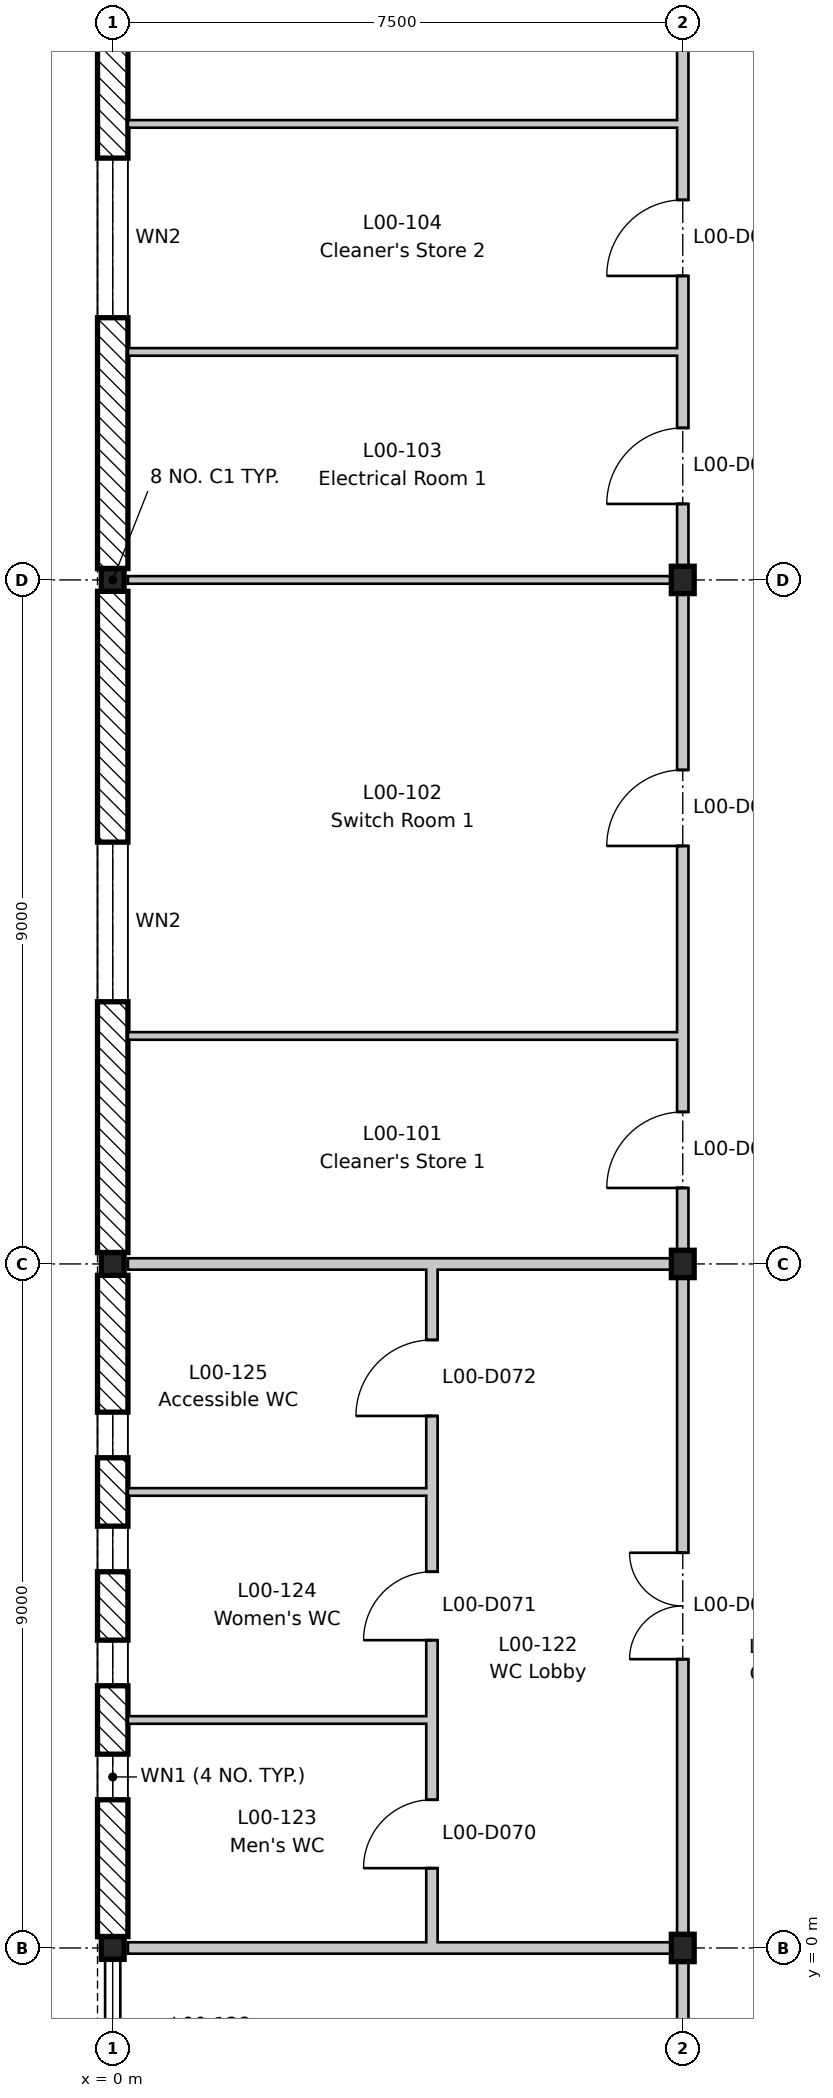
"""IFC4 building model, lengths in metres.
Left out: names, types, materials, properties, quantities, classifications, styles, units other than length and angle.
Written with IfcOpenShell. Run it as: python <this file> out.ifc"""

import sys

from ifc_helpers import new_model, si_unit, direction, frame, frame_2d, origin, origin_2d, place, context, subcontext, project, spatial, rectangle, i_section, extrude, element, fill, save


model = new_model("IFC4")
c1 = context("Model", 3, precision=1e-05, world=origin(), true_north=direction((0.0, 1.0)))
c2 = subcontext(c1, "Body", "Model", "MODEL_VIEW")
j1 = project(units=[si_unit("LENGTHUNIT", "METRE"), si_unit("PLANEANGLEUNIT", "RADIAN")], contexts=[c1])
p1 = place(None, origin())
s1 = spatial("IfcSite", under=j1, at=p1, CompositionType="ELEMENT")
p2 = place(p1, origin())
s2 = spatial("IfcBuilding", under=s1, at=p2, CompositionType="ELEMENT")
p3 = place(p2, origin())
s3 = spatial("IfcBuildingStorey", under=s2, at=p3, CompositionType="ELEMENT", Elevation=0.0)
for number, where, z_axis, x_axis in (
    (1, (0.0, 0.0, -0.6), (0.0, 0.0, 1.0), (1.0, 0.0, 0.0)),
    (2, (0.0, 9.0, -0.6), (0.0, 0.0, 1.0), (1.0, 0.0, 0.0)),
    (3, (0.0, 18.0, -0.6), (0.0, 0.0, 1.0), (1.0, 0.0, 0.0)),
):
    element("IfcColumn", number, at=place(p3, frame(where, z_axis=z_axis, x_axis=x_axis)), inside=s3, PredefinedType="COLUMN", context=c2, shape_type="SweptSolid", body=[
        extrude(i_section(OverallWidth=0.3, OverallDepth=0.3, WebThickness=0.011, FlangeThickness=0.019, FilletRadius=0.027, at=origin_2d()), origin(), (0.0, 0.0, 1.0), 5.8),
    ])
for number, where, z_axis, x_axis in (
    (4, (7.5, 0.0, -0.6), (0.0, 0.0, 1.0), (1.0, 0.0, 0.0)),
    (5, (7.5, 9.0, -0.6), (0.0, 0.0, 1.0), (1.0, 0.0, 0.0)),
    (6, (7.5, 18.0, -0.6), (0.0, 0.0, 1.0), (1.0, 0.0, 0.0)),
):
    element("IfcColumn", number, at=place(p3, frame(where, z_axis=z_axis, x_axis=x_axis)), inside=s3, PredefinedType="COLUMN", context=c2, shape_type="SweptSolid", body=[
        extrude(i_section(OverallWidth=0.3, OverallDepth=0.36, WebThickness=0.012, FlangeThickness=0.022, FilletRadius=0.027, at=origin_2d()), origin(), (0.0, 0.0, 1.0), 5.8),
    ])
p4 = place(p3, frame((0.0, 0.15, 0.0), z_axis=(0.0, 0.0, 1.0), x_axis=(0.0, 1.0, 0.0)))
e7 = element("IfcWall", 7, at=p4, inside=s3, PredefinedType="STANDARD", context=c2, shape_type="SweptSolid", body=[
    extrude(rectangle(XDim=8.7, YDim=0.4, at=frame_2d((4.35, 0.0))), origin(), (0.0, 0.0, 1.0), 4.8),
])
p5 = place(p4, frame((1.8, 0.0, 1.5)))
e8 = element("IfcOpeningElement", 8, at=p5, cuts=e7, PredefinedType="OPENING", context=c2, shape_type="SweptSolid", body=[
    extrude(rectangle(XDim=0.6, YDim=1.2, at=frame_2d((0.3, 0.6))), frame((0.0, 0.21, 0.0), z_axis=(0.0, -1.0, 0.0), x_axis=(1.0, 0.0, 0.0)), (0.0, 0.0, 1.0), 0.42),
])
p6 = place(p4, frame((3.3, 0.0, 1.5)))
e9 = element("IfcOpeningElement", 9, at=p6, cuts=e7, PredefinedType="OPENING", context=c2, shape_type="SweptSolid", body=[
    extrude(rectangle(XDim=0.6, YDim=1.2, at=frame_2d((0.3, 0.6))), frame((0.0, 0.21, 0.0), z_axis=(0.0, -1.0, 0.0), x_axis=(1.0, 0.0, 0.0)), (0.0, 0.0, 1.0), 0.42),
])
p7 = place(p4, frame((4.8, 0.0, 1.5)))
e10 = element("IfcOpeningElement", 10, at=p7, cuts=e7, PredefinedType="OPENING", context=c2, shape_type="SweptSolid", body=[
    extrude(rectangle(XDim=0.6, YDim=1.2, at=frame_2d((0.3, 0.6))), frame((0.0, 0.21, 0.0), z_axis=(0.0, -1.0, 0.0), x_axis=(1.0, 0.0, 0.0)), (0.0, 0.0, 1.0), 0.42),
])
p8 = place(p4, frame((6.3, 0.0, 1.5)))
e11 = element("IfcOpeningElement", 11, at=p8, cuts=e7, PredefinedType="OPENING", context=c2, shape_type="SweptSolid", body=[
    extrude(rectangle(XDim=0.6, YDim=1.2, at=frame_2d((0.3, 0.6))), frame((0.0, 0.21, 0.0), z_axis=(0.0, -1.0, 0.0), x_axis=(1.0, 0.0, 0.0)), (0.0, 0.0, 1.0), 0.42),
])
p9 = place(p3, frame((0.0, 9.15, 0.0), z_axis=(0.0, 0.0, 1.0), x_axis=(0.0, 1.0, 0.0)))
e12 = element("IfcWall", 12, at=p9, inside=s3, PredefinedType="STANDARD", context=c2, shape_type="SweptSolid", body=[
    extrude(rectangle(XDim=8.7, YDim=0.4, at=frame_2d((4.35, 0.0))), origin(), (0.0, 0.0, 1.0), 4.8),
])
p10 = place(p9, frame((3.3, 0.0, 0.9)))
e13 = element("IfcOpeningElement", 13, at=p10, cuts=e12, PredefinedType="OPENING", context=c2, shape_type="SweptSolid", body=[
    extrude(rectangle(XDim=2.1, YDim=2.1, at=frame_2d((1.05, 1.05))), frame((0.0, 0.21, 0.0), z_axis=(0.0, -1.0, 0.0), x_axis=(1.0, 0.0, 0.0)), (0.0, 0.0, 1.0), 0.42),
])
p11 = place(p3, frame((0.0, 18.15, 0.0), z_axis=(0.0, 0.0, 1.0), x_axis=(0.0, 1.0, 0.0)))
e14 = element("IfcWall", 14, at=p11, inside=s3, PredefinedType="STANDARD", context=c2, shape_type="SweptSolid", body=[
    extrude(rectangle(XDim=8.7, YDim=0.4, at=frame_2d((4.35, 0.0))), origin(), (0.0, 0.0, 1.0), 4.8),
])
p12 = place(p11, frame((3.3, 0.0, 0.9)))
e15 = element("IfcOpeningElement", 15, at=p12, cuts=e14, PredefinedType="OPENING", context=c2, shape_type="SweptSolid", body=[
    extrude(rectangle(XDim=2.1, YDim=2.1, at=frame_2d((1.05, 1.05))), frame((0.0, 0.21, 0.0), z_axis=(0.0, -1.0, 0.0), x_axis=(1.0, 0.0, 0.0)), (0.0, 0.0, 1.0), 0.42),
])
p13 = place(p3, frame((0.2, 9.0, 0.0), z_axis=(0.0, 0.0, 1.0), x_axis=(1.0, 0.0, 0.0)))
e16 = element("IfcWall", 16, at=p13, inside=s3, PredefinedType="PARTITIONING", context=c2, shape_type="SweptSolid", body=[
    extrude(rectangle(XDim=7.225, YDim=0.15, at=frame_2d((3.613, 0.0))), origin(), (0.0, 0.0, 1.0), 4.85),
])
p14 = place(p3, frame((0.2, 12.0, 0.0), z_axis=(0.0, 0.0, 1.0), x_axis=(1.0, 0.0, 0.0)))
e17 = element("IfcWall", 17, at=p14, inside=s3, PredefinedType="PARTITIONING", context=c2, shape_type="SweptSolid", body=[
    extrude(rectangle(XDim=7.225, YDim=0.1, at=frame_2d((3.613, 0.0))), origin(), (0.0, 0.0, 1.0), 5.2),
])
p15 = place(p3, frame((0.2, 18.0, 0.0), z_axis=(0.0, 0.0, 1.0), x_axis=(1.0, 0.0, 0.0)))
e18 = element("IfcWall", 18, at=p15, inside=s3, PredefinedType="PARTITIONING", context=c2, shape_type="SweptSolid", body=[
    extrude(rectangle(XDim=7.225, YDim=0.1, at=frame_2d((3.613, 0.0))), origin(), (0.0, 0.0, 1.0), 4.85),
])
for number, where, z_axis, x_axis in (
    (19, (0.2, 21.0, 0.0), (0.0, 0.0, 1.0), (1.0, 0.0, 0.0)),
    (20, (0.2, 24.0, 0.0), (0.0, 0.0, 1.0), (1.0, 0.0, 0.0)),
):
    element("IfcWall", number, at=place(p3, frame(where, z_axis=z_axis, x_axis=x_axis)), inside=s3, PredefinedType="PARTITIONING", context=c2, shape_type="SweptSolid", body=[
        extrude(rectangle(XDim=7.225, YDim=0.1, at=frame_2d((3.613, 0.0))), origin(), (0.0, 0.0, 1.0), 5.2),
    ])
p16 = place(p3, frame((0.2, 0.0, 0.0), z_axis=(0.0, 0.0, 1.0), x_axis=(1.0, 0.0, 0.0)))
e21 = element("IfcWall", 21, at=p16, inside=s3, PredefinedType="PARTITIONING", context=c2, shape_type="SweptSolid", body=[
    extrude(rectangle(XDim=7.225, YDim=0.15, at=frame_2d((3.613, 0.0))), origin(), (0.0, 0.0, 1.0), 4.85),
])
p17 = place(p3, frame((7.5, -8.8, 0.0), z_axis=(0.0, 0.0, 1.0), x_axis=(0.0, 1.0, 0.0)))
e22 = element("IfcWall", 22, at=p17, inside=s3, PredefinedType="PARTITIONING", context=c2, shape_type="SweptSolid", body=[
    extrude(rectangle(XDim=79.3, YDim=0.15, at=frame_2d((39.65, 0.0))), origin(), (0.0, 0.0, 1.0), 4.68),
])
p18 = place(p17, frame((18.8, 0.0, 0.0)))
e23 = element("IfcOpeningElement", 23, at=p18, cuts=e22, PredefinedType="OPENING", context=c2, shape_type="SweptSolid", body=[
    extrude(rectangle(XDim=1.0, YDim=2.1, at=frame_2d((0.5, 1.05))), frame((0.0, 0.085, 0.0), z_axis=(0.0, -1.0, 0.0), x_axis=(1.0, 0.0, 0.0)), (0.0, 0.0, 1.0), 0.17),
])
p19 = place(p17, frame((23.3, 0.0, 0.0)))
e24 = element("IfcOpeningElement", 24, at=p19, cuts=e22, PredefinedType="OPENING", context=c2, shape_type="SweptSolid", body=[
    extrude(rectangle(XDim=1.0, YDim=2.1, at=frame_2d((0.5, 1.05))), frame((0.0, 0.085, 0.0), z_axis=(0.0, -1.0, 0.0), x_axis=(1.0, 0.0, 0.0)), (0.0, 0.0, 1.0), 0.17),
])
p20 = place(p17, frame((27.8, 0.0, 0.0)))
e25 = element("IfcOpeningElement", 25, at=p20, cuts=e22, PredefinedType="OPENING", context=c2, shape_type="SweptSolid", body=[
    extrude(rectangle(XDim=1.0, YDim=2.1, at=frame_2d((0.5, 1.05))), frame((0.0, 0.085, 0.0), z_axis=(0.0, -1.0, 0.0), x_axis=(1.0, 0.0, 0.0)), (0.0, 0.0, 1.0), 0.17),
])
p21 = place(p17, frame((30.8, 0.0, 0.0)))
e26 = element("IfcOpeningElement", 26, at=p21, cuts=e22, PredefinedType="OPENING", context=c2, shape_type="SweptSolid", body=[
    extrude(rectangle(XDim=1.0, YDim=2.1, at=frame_2d((0.5, 1.05))), frame((0.0, 0.085, 0.0), z_axis=(0.0, -1.0, 0.0), x_axis=(1.0, 0.0, 0.0)), (0.0, 0.0, 1.0), 0.17),
])
p22 = place(p17, frame((33.8, 0.0, 0.0)))
e27 = element("IfcOpeningElement", 27, at=p22, cuts=e22, PredefinedType="OPENING", context=c2, shape_type="SweptSolid", body=[
    extrude(rectangle(XDim=1.0, YDim=2.1, at=frame_2d((0.5, 1.05))), frame((0.0, 0.085, 0.0), z_axis=(0.0, -1.0, 0.0), x_axis=(1.0, 0.0, 0.0)), (0.0, 0.0, 1.0), 0.17),
])
p23 = place(p17, frame((48.6, 0.0, 0.0)))
e28 = element("IfcOpeningElement", 28, at=p23, cuts=e22, PredefinedType="OPENING", context=c2, shape_type="SweptSolid", body=[
    extrude(rectangle(XDim=1.4, YDim=2.1, at=frame_2d((0.7, 1.05))), frame((0.0, 0.085, 0.0), z_axis=(0.0, -1.0, 0.0), x_axis=(1.0, 0.0, 0.0)), (0.0, 0.0, 1.0), 0.17),
])
p24 = place(p17, frame((56.3, 0.0, 0.0)))
e29 = element("IfcOpeningElement", 29, at=p24, cuts=e22, PredefinedType="OPENING", context=c2, shape_type="SweptSolid", body=[
    extrude(rectangle(XDim=1.0, YDim=2.1, at=frame_2d((0.5, 1.05))), frame((0.0, 0.085, 0.0), z_axis=(0.0, -1.0, 0.0), x_axis=(1.0, 0.0, 0.0)), (0.0, 0.0, 1.0), 0.17),
])
p25 = place(p17, frame((60.8, 0.0, 0.0)))
e30 = element("IfcOpeningElement", 30, at=p25, cuts=e22, PredefinedType="OPENING", context=c2, shape_type="SweptSolid", body=[
    extrude(rectangle(XDim=1.0, YDim=2.1, at=frame_2d((0.5, 1.05))), frame((0.0, 0.085, 0.0), z_axis=(0.0, -1.0, 0.0), x_axis=(1.0, 0.0, 0.0)), (0.0, 0.0, 1.0), 0.17),
])
p26 = place(p17, frame((12.6, 0.0, 0.0)))
e31 = element("IfcOpeningElement", 31, at=p26, cuts=e22, PredefinedType="OPENING", context=c2, shape_type="SweptSolid", body=[
    extrude(rectangle(XDim=1.4, YDim=2.1, at=frame_2d((0.7, 1.05))), frame((0.0, 0.085, 0.0), z_axis=(0.0, -1.0, 0.0), x_axis=(1.0, 0.0, 0.0)), (0.0, 0.0, 1.0), 0.17),
])
p27 = place(p17, frame((3.6, 0.0, 0.0)))
e32 = element("IfcOpeningElement", 32, at=p27, cuts=e22, PredefinedType="OPENING", context=c2, shape_type="SweptSolid", body=[
    extrude(rectangle(XDim=1.4, YDim=2.1, at=frame_2d((0.7, 1.05))), frame((0.0, 0.085, 0.0), z_axis=(0.0, -1.0, 0.0), x_axis=(1.0, 0.0, 0.0)), (0.0, 0.0, 1.0), 0.17),
])
p28 = place(p17, frame((63.55, 0.0, 0.0)))
e33 = element("IfcOpeningElement", 33, at=p28, cuts=e22, PredefinedType="OPENING", context=c2, shape_type="SweptSolid", body=[
    extrude(rectangle(XDim=1.4, YDim=2.1, at=frame_2d((0.7, 1.05))), frame((0.0, 0.085, 0.0), z_axis=(0.0, -1.0, 0.0), x_axis=(1.0, 0.0, 0.0)), (0.0, 0.0, 1.0), 0.17),
])
p29 = place(p17, frame((69.6, 0.0, 0.0)))
e34 = element("IfcOpeningElement", 34, at=p29, cuts=e22, PredefinedType="OPENING", context=c2, shape_type="SweptSolid", body=[
    extrude(rectangle(XDim=1.4, YDim=2.1, at=frame_2d((0.7, 1.05))), frame((0.0, 0.085, 0.0), z_axis=(0.0, -1.0, 0.0), x_axis=(1.0, 0.0, 0.0)), (0.0, 0.0, 1.0), 0.17),
])
p30 = place(p17, frame((42.85, 0.0, 0.0)))
e35 = element("IfcOpeningElement", 35, at=p30, cuts=e22, PredefinedType="OPENING", context=c2, shape_type="SweptSolid", body=[
    extrude(rectangle(XDim=1.0, YDim=2.1, at=frame_2d((0.5, 1.05))), frame((0.0, 0.085, 0.0), z_axis=(0.0, -1.0, 0.0), x_axis=(1.0, 0.0, 0.0)), (0.0, 0.0, 1.0), 0.17),
])
p31 = place(p17, frame((36.55, 0.0, 0.0)))
e36 = element("IfcOpeningElement", 36, at=p31, cuts=e22, PredefinedType="OPENING", context=c2, shape_type="SweptSolid", body=[
    extrude(rectangle(XDim=1.4, YDim=2.1, at=frame_2d((0.7, 1.05))), frame((0.0, 0.085, 0.0), z_axis=(0.0, -1.0, 0.0), x_axis=(1.0, 0.0, 0.0)), (0.0, 0.0, 1.0), 0.17),
])
p32 = place(p17, frame((72.8, 0.0, 0.0)))
e37 = element("IfcOpeningElement", 37, at=p32, cuts=e22, PredefinedType="OPENING", context=c2, shape_type="SweptSolid", body=[
    extrude(rectangle(XDim=1.0, YDim=2.1, at=frame_2d((0.5, 1.05))), frame((0.0, 0.085, 0.0), z_axis=(0.0, -1.0, 0.0), x_axis=(1.0, 0.0, 0.0)), (0.0, 0.0, 1.0), 0.17),
])
p33 = place(p3, frame((4.2, 0.075, 0.0), z_axis=(0.0, 0.0, 1.0), x_axis=(0.0, 1.0, 0.0)))
e38 = element("IfcWall", 38, at=p33, inside=s3, PredefinedType="PARTITIONING", context=c2, shape_type="SweptSolid", body=[
    extrude(rectangle(XDim=8.85, YDim=0.15, at=frame_2d((4.425, 0.0))), origin(), (0.0, 0.0, 1.0), 5.2),
])
p34 = place(p33, frame((0.975, 0.0, 0.0)))
e39 = element("IfcOpeningElement", 39, at=p34, cuts=e38, PredefinedType="OPENING", context=c2, shape_type="SweptSolid", body=[
    extrude(rectangle(XDim=0.9, YDim=2.1, at=frame_2d((0.45, 1.05))), frame((0.0, 0.085, 0.0), z_axis=(0.0, -1.0, 0.0), x_axis=(1.0, 0.0, 0.0)), (0.0, 0.0, 1.0), 0.17),
])
p35 = place(p33, frame((3.975, 0.0, 0.0)))
e40 = element("IfcOpeningElement", 40, at=p35, cuts=e38, PredefinedType="OPENING", context=c2, shape_type="SweptSolid", body=[
    extrude(rectangle(XDim=0.9, YDim=2.1, at=frame_2d((0.45, 1.05))), frame((0.0, 0.085, 0.0), z_axis=(0.0, -1.0, 0.0), x_axis=(1.0, 0.0, 0.0)), (0.0, 0.0, 1.0), 0.17),
])
p36 = place(p33, frame((6.925, 0.0, 0.0)))
e41 = element("IfcOpeningElement", 41, at=p36, cuts=e38, PredefinedType="OPENING", context=c2, shape_type="SweptSolid", body=[
    extrude(rectangle(XDim=1.0, YDim=2.1, at=frame_2d((0.5, 1.05))), frame((0.0, 0.085, 0.0), z_axis=(0.0, -1.0, 0.0), x_axis=(1.0, 0.0, 0.0)), (0.0, 0.0, 1.0), 0.17),
])
for number, where, z_axis, x_axis in (
    (42, (0.2, 3.0, 0.0), (0.0, 0.0, 1.0), (1.0, 0.0, 0.0)),
    (43, (0.2, 6.0, 0.0), (0.0, 0.0, 1.0), (1.0, 0.0, 0.0)),
):
    element("IfcWall", number, at=place(p3, frame(where, z_axis=z_axis, x_axis=x_axis)), inside=s3, PredefinedType="PARTITIONING", context=c2, shape_type="SweptSolid", body=[
        extrude(rectangle(XDim=3.925, YDim=0.1, at=frame_2d((1.962, 0.0))), origin(), (0.0, 0.0, 1.0), 5.2),
    ])
p37 = place(p5, origin())
e44 = element("IfcWindow", 44, at=p37, inside=s3, PartitioningType="SINGLE_PANEL", PredefinedType="WINDOW", context=c2, shape_type="SweptSolid", body=[
    extrude(rectangle(XDim=0.6, YDim=1.2, at=frame_2d((0.3, 0.6))), frame((0.0, 0.03, 0.0), z_axis=(0.0, -1.0, 0.0), x_axis=(1.0, 0.0, 0.0)), (0.0, 0.0, 1.0), 0.06),
])
fill(e8, e44)
p38 = place(p6, origin())
e45 = element("IfcWindow", 45, at=p38, inside=s3, PartitioningType="SINGLE_PANEL", PredefinedType="WINDOW", context=c2, shape_type="SweptSolid", body=[
    extrude(rectangle(XDim=0.6, YDim=1.2, at=frame_2d((0.3, 0.6))), frame((0.0, 0.03, 0.0), z_axis=(0.0, -1.0, 0.0), x_axis=(1.0, 0.0, 0.0)), (0.0, 0.0, 1.0), 0.06),
])
fill(e9, e45)
p39 = place(p7, origin())
e46 = element("IfcWindow", 46, at=p39, inside=s3, PartitioningType="SINGLE_PANEL", PredefinedType="WINDOW", context=c2, shape_type="SweptSolid", body=[
    extrude(rectangle(XDim=0.6, YDim=1.2, at=frame_2d((0.3, 0.6))), frame((0.0, 0.03, 0.0), z_axis=(0.0, -1.0, 0.0), x_axis=(1.0, 0.0, 0.0)), (0.0, 0.0, 1.0), 0.06),
])
fill(e10, e46)
p40 = place(p8, origin())
e47 = element("IfcWindow", 47, at=p40, inside=s3, PartitioningType="SINGLE_PANEL", PredefinedType="WINDOW", context=c2, shape_type="SweptSolid", body=[
    extrude(rectangle(XDim=0.6, YDim=1.2, at=frame_2d((0.3, 0.6))), frame((0.0, 0.03, 0.0), z_axis=(0.0, -1.0, 0.0), x_axis=(1.0, 0.0, 0.0)), (0.0, 0.0, 1.0), 0.06),
])
fill(e11, e47)
p41 = place(p10, origin())
e48 = element("IfcWindow", 48, at=p41, inside=s3, PartitioningType="SINGLE_PANEL", PredefinedType="WINDOW", context=c2, shape_type="SweptSolid", body=[
    extrude(rectangle(XDim=2.1, YDim=2.1, at=frame_2d((1.05, 1.05))), frame((0.0, 0.03, 0.0), z_axis=(0.0, -1.0, 0.0), x_axis=(1.0, 0.0, 0.0)), (0.0, 0.0, 1.0), 0.06),
])
fill(e13, e48)
p42 = place(p12, origin())
e49 = element("IfcWindow", 49, at=p42, inside=s3, PartitioningType="SINGLE_PANEL", PredefinedType="WINDOW", context=c2, shape_type="SweptSolid", body=[
    extrude(rectangle(XDim=2.1, YDim=2.1, at=frame_2d((1.05, 1.05))), frame((0.0, 0.03, 0.0), z_axis=(0.0, -1.0, 0.0), x_axis=(1.0, 0.0, 0.0)), (0.0, 0.0, 1.0), 0.06),
])
fill(e15, e49)
p43 = place(p18, origin())
e50 = element("IfcDoor", 50, at=p43, inside=s3, OperationType="SINGLE_SWING_LEFT", PredefinedType="DOOR", context=c2, shape_type="SweptSolid", body=[
    extrude(rectangle(XDim=1.0, YDim=2.1, at=frame_2d((0.5, 1.05))), frame((0.0, 0.025, 0.0), z_axis=(0.0, -1.0, 0.0), x_axis=(1.0, 0.0, 0.0)), (0.0, 0.0, 1.0), 0.05),
])
fill(e23, e50)
p44 = place(p19, origin())
e51 = element("IfcDoor", 51, at=p44, inside=s3, OperationType="SINGLE_SWING_LEFT", PredefinedType="DOOR", context=c2, shape_type="SweptSolid", body=[
    extrude(rectangle(XDim=1.0, YDim=2.1, at=frame_2d((0.5, 1.05))), frame((0.0, 0.025, 0.0), z_axis=(0.0, -1.0, 0.0), x_axis=(1.0, 0.0, 0.0)), (0.0, 0.0, 1.0), 0.05),
])
fill(e24, e51)
p45 = place(p20, origin())
e52 = element("IfcDoor", 52, at=p45, inside=s3, OperationType="SINGLE_SWING_LEFT", PredefinedType="DOOR", context=c2, shape_type="SweptSolid", body=[
    extrude(rectangle(XDim=1.0, YDim=2.1, at=frame_2d((0.5, 1.05))), frame((0.0, 0.025, 0.0), z_axis=(0.0, -1.0, 0.0), x_axis=(1.0, 0.0, 0.0)), (0.0, 0.0, 1.0), 0.05),
])
fill(e25, e52)
p46 = place(p21, origin())
e53 = element("IfcDoor", 53, at=p46, inside=s3, OperationType="SINGLE_SWING_LEFT", PredefinedType="DOOR", context=c2, shape_type="SweptSolid", body=[
    extrude(rectangle(XDim=1.0, YDim=2.1, at=frame_2d((0.5, 1.05))), frame((0.0, 0.025, 0.0), z_axis=(0.0, -1.0, 0.0), x_axis=(1.0, 0.0, 0.0)), (0.0, 0.0, 1.0), 0.05),
])
fill(e26, e53)
p47 = place(p26, origin())
e54 = element("IfcDoor", 54, at=p47, inside=s3, OperationType="DOUBLE_DOOR_SINGLE_SWING", PredefinedType="DOOR", context=c2, shape_type="SweptSolid", body=[
    extrude(rectangle(XDim=1.4, YDim=2.1, at=frame_2d((0.7, 1.05))), frame((0.0, 0.025, 0.0), z_axis=(0.0, -1.0, 0.0), x_axis=(1.0, 0.0, 0.0)), (0.0, 0.0, 1.0), 0.05),
])
fill(e31, e54)
p48 = place(p34, origin())
e55 = element("IfcDoor", 55, at=p48, inside=s3, OperationType="SINGLE_SWING_LEFT", PredefinedType="DOOR", context=c2, shape_type="SweptSolid", body=[
    extrude(rectangle(XDim=0.9, YDim=2.1, at=frame_2d((0.45, 1.05))), frame((0.0, 0.025, 0.0), z_axis=(0.0, -1.0, 0.0), x_axis=(1.0, 0.0, 0.0)), (0.0, 0.0, 1.0), 0.05),
])
fill(e39, e55)
p49 = place(p35, origin())
e56 = element("IfcDoor", 56, at=p49, inside=s3, OperationType="SINGLE_SWING_LEFT", PredefinedType="DOOR", context=c2, shape_type="SweptSolid", body=[
    extrude(rectangle(XDim=0.9, YDim=2.1, at=frame_2d((0.45, 1.05))), frame((0.0, 0.025, 0.0), z_axis=(0.0, -1.0, 0.0), x_axis=(1.0, 0.0, 0.0)), (0.0, 0.0, 1.0), 0.05),
])
fill(e40, e56)
p50 = place(p36, origin())
e57 = element("IfcDoor", 57, at=p50, inside=s3, OperationType="SINGLE_SWING_LEFT", PredefinedType="DOOR", context=c2, shape_type="SweptSolid", body=[
    extrude(rectangle(XDim=1.0, YDim=2.1, at=frame_2d((0.5, 1.05))), frame((0.0, 0.025, 0.0), z_axis=(0.0, -1.0, 0.0), x_axis=(1.0, 0.0, 0.0)), (0.0, 0.0, 1.0), 0.05),
])
fill(e41, e57)
save(model, sys.argv[1])
